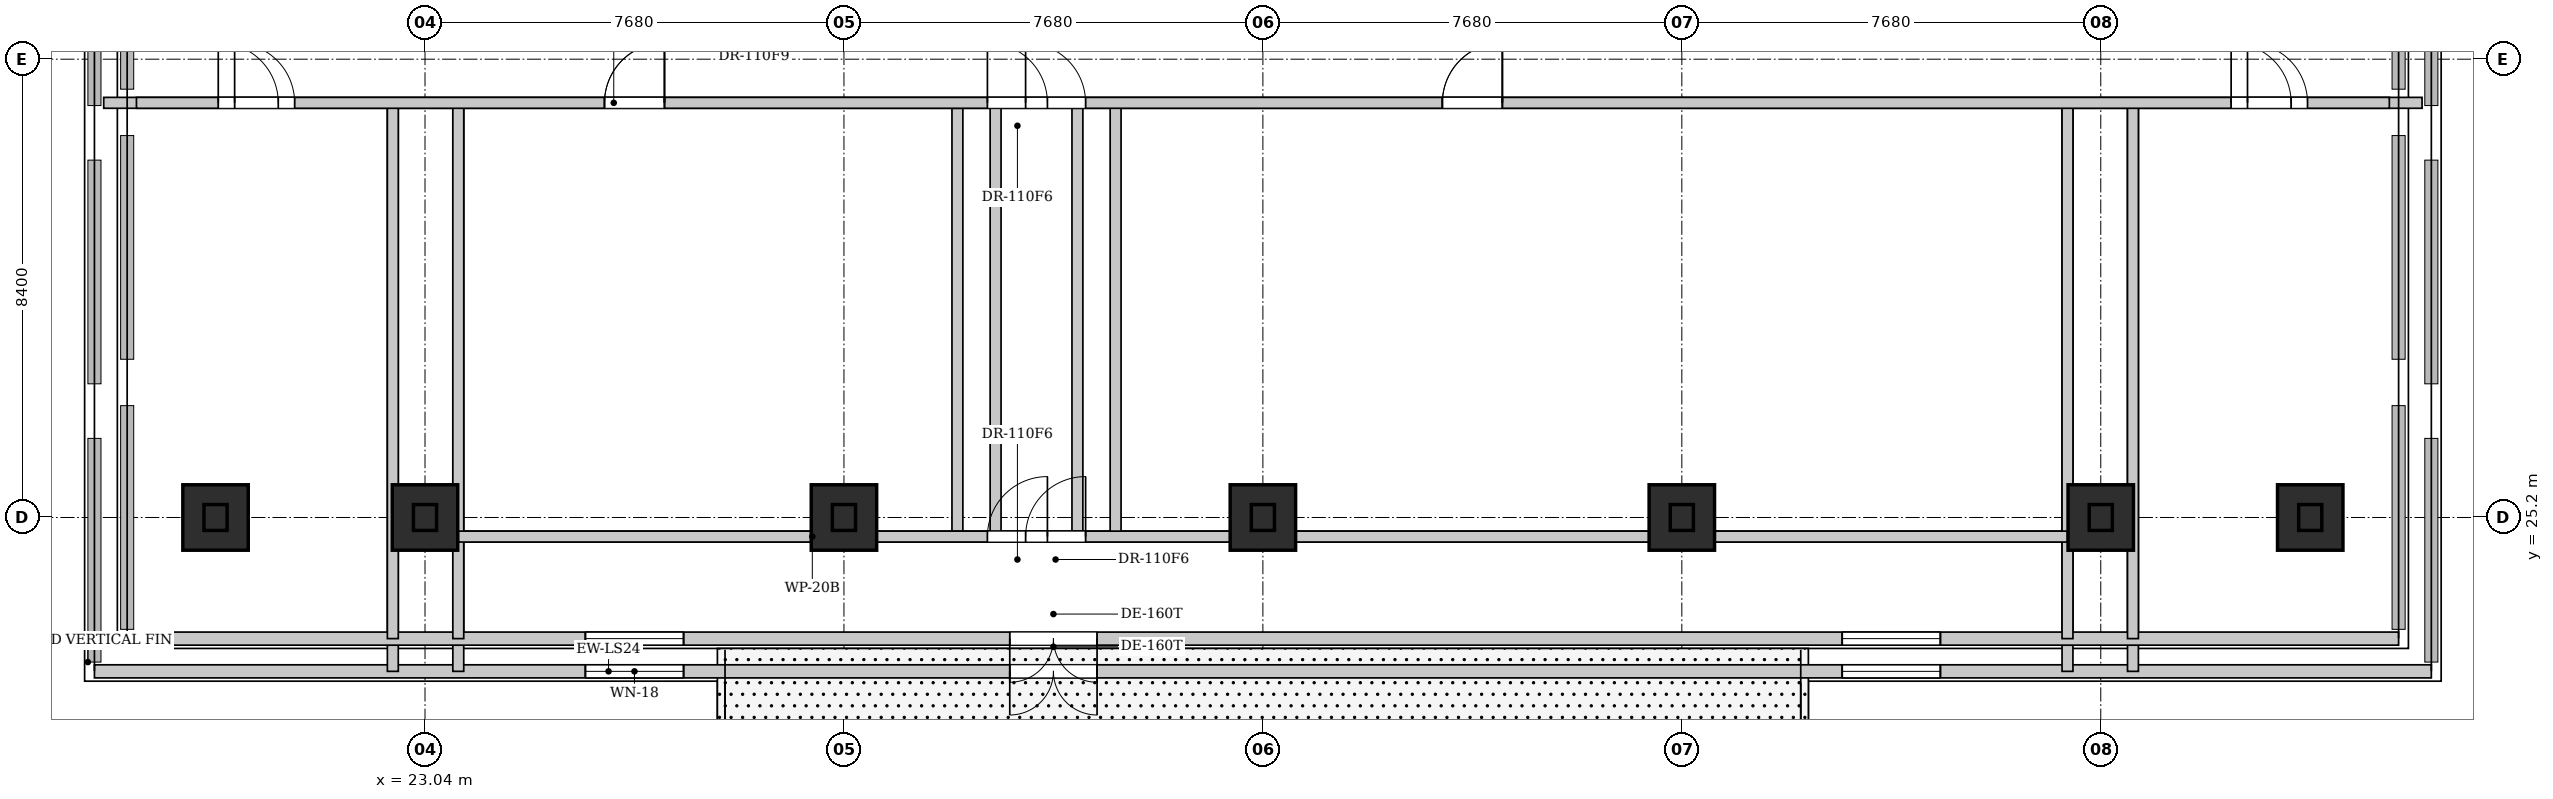
"""IFC4 building model, lengths in metres.
Left out: names, types, materials, properties, quantities, classifications, styles, units other than length and angle.
Written with IfcOpenShell. Run it as: python <this file> out.ifc"""

import sys

from ifc_helpers import new_model, si_unit, direction, frame, frame_2d, origin, origin_2d, place, context, subcontext, project, spatial, rectangle, extrude, element, fill, save


model = new_model("IFC4")
c1 = context("Model", 3, precision=1e-05, world=origin(), true_north=direction((0.0, 1.0)))
c2 = subcontext(c1, "Body", "Model", "MODEL_VIEW")
j1 = project(units=[si_unit("LENGTHUNIT", "METRE"), si_unit("PLANEANGLEUNIT", "RADIAN")], contexts=[c1])
p1 = place(None, origin())
s1 = spatial("IfcSite", under=j1, at=p1, CompositionType="ELEMENT")
p2 = place(p1, origin())
s2 = spatial("IfcBuilding", under=s1, at=p2, CompositionType="ELEMENT")
p3 = place(p2, frame((0.0, 0.0, 78.0)))
s3 = spatial("IfcBuildingStorey", under=s2, at=p3, CompositionType="ELEMENT", Elevation=78.0)
for number, where, z_axis, x_axis in (
    (1, (23.04, 25.2, 0.0), (0.0, 0.0, 1.0), (1.0, 0.0, 0.0)),
    (2, (30.72, 25.2, 0.0), (0.0, 0.0, 1.0), (1.0, 0.0, 0.0)),
    (3, (38.4, 25.2, 0.0), (0.0, 0.0, 1.0), (1.0, 0.0, 0.0)),
    (4, (46.08, 25.2, 0.0), (0.0, 0.0, 1.0), (1.0, 0.0, 0.0)),
    (5, (53.76, 25.2, 0.0), (0.0, 0.0, 1.0), (1.0, 0.0, 0.0)),
    (6, (19.2, 25.2, 0.0), (0.0, 0.0, 1.0), (1.0, 0.0, 0.0)),
    (7, (57.6, 25.2, 0.0), (0.0, 0.0, 1.0), (1.0, 0.0, 0.0)),
):
    element("IfcColumn", number, at=place(p3, frame(where, z_axis=z_axis, x_axis=x_axis)), inside=s3, PredefinedType="COLUMN", context=c2, shape_type="SweptSolid", body=[
        extrude(rectangle(XDim=1.2, YDim=1.2, at=origin_2d()), origin(), (0.0, 0.0, 1.0), 3.9),
    ])
p4 = place(p3, frame((16.98, 22.38, 0.0), z_axis=(0.0, 0.0, 1.0), x_axis=(1.0, 0.0, 0.0)))
e8 = element("IfcWall", 8, at=p4, inside=s3, PredefinedType="SOLIDWALL", context=c2, shape_type="SweptSolid", body=[
    extrude(rectangle(XDim=42.84, YDim=0.24, at=frame_2d((21.42, 0.0))), origin(), (0.0, 0.0, 1.0), 3.68),
])
p5 = place(p4, frame((16.78, 0.0, 0.0)))
e9 = element("IfcOpeningElement", 9, at=p5, cuts=e8, PredefinedType="OPENING", context=c2, shape_type="SweptSolid", body=[
    extrude(rectangle(XDim=1.6, YDim=2.25, at=frame_2d((0.8, 1.125))), frame((0.0, 0.13, 0.0), z_axis=(0.0, -1.0, 0.0), x_axis=(1.0, 0.0, 0.0)), (0.0, 0.0, 1.0), 0.26),
])
p6 = place(p4, frame((9.0, 0.0, 0.9)))
e10 = element("IfcOpeningElement", 10, at=p6, cuts=e8, PredefinedType="OPENING", context=c2, shape_type="SweptSolid", body=[
    extrude(rectangle(XDim=1.8, YDim=2.0, at=frame_2d((0.9, 1.0))), frame((0.0, 0.13, 0.0), z_axis=(0.0, -1.0, 0.0), x_axis=(1.0, 0.0, 0.0)), (0.0, 0.0, 1.0), 0.26),
])
p7 = place(p4, frame((32.04, 0.0, 0.9)))
e11 = element("IfcOpeningElement", 11, at=p7, cuts=e8, PredefinedType="OPENING", context=c2, shape_type="SweptSolid", body=[
    extrude(rectangle(XDim=1.8, YDim=2.0, at=frame_2d((0.9, 1.0))), frame((0.0, 0.13, 0.0), z_axis=(0.0, -1.0, 0.0), x_axis=(1.0, 0.0, 0.0)), (0.0, 0.0, 1.0), 0.26),
])
for number, where, z_axis, x_axis in (
    (12, (22.45, 22.38, 0.0), (0.0, 0.0, 1.0), (0.0, 1.0, 0.0)),
    (13, (23.65, 22.38, 0.0), (0.0, 0.0, 1.0), (0.0, 1.0, 0.0)),
    (14, (53.15, 22.38, 0.0), (0.0, 0.0, 1.0), (0.0, 1.0, 0.0)),
    (15, (54.35, 22.38, 0.0), (0.0, 0.0, 1.0), (0.0, 1.0, 0.0)),
):
    element("IfcWall", number, at=place(p3, frame(where, z_axis=z_axis, x_axis=x_axis)), inside=s3, PredefinedType="PARTITIONING", context=c2, shape_type="SweptSolid", body=[
        extrude(rectangle(XDim=10.42, YDim=0.2, at=frame_2d((5.21, 0.0))), origin(), (0.0, 0.0, 1.0), 3.68),
    ])
for number, where, z_axis, x_axis in (
    (16, (32.8, 24.85, 0.0), (0.0, 0.0, 1.0), (0.0, 1.0, 0.0)),
    (17, (35.0, 24.85, 0.0), (0.0, 0.0, 1.0), (0.0, 1.0, 0.0)),
):
    element("IfcWall", number, at=place(p3, frame(where, z_axis=z_axis, x_axis=x_axis)), inside=s3, PredefinedType="PARTITIONING", context=c2, shape_type="SweptSolid", body=[
        extrude(rectangle(XDim=7.95, YDim=0.2, at=frame_2d((3.975, 0.0))), origin(), (0.0, 0.0, 1.0), 3.68),
    ])
p8 = place(p3, frame((23.65, 24.85, 0.0), z_axis=(0.0, 0.0, 1.0), x_axis=(1.0, 0.0, 0.0)))
e18 = element("IfcWall", 18, at=p8, inside=s3, PredefinedType="PARTITIONING", context=c2, shape_type="SweptSolid", body=[
    extrude(rectangle(XDim=29.5, YDim=0.2, at=frame_2d((14.75, 0.0))), origin(), (0.0, 0.0, 1.0), 3.68),
])
p9 = place(p8, frame((9.7, 0.0, 0.0)))
e19 = element("IfcOpeningElement", 19, at=p9, cuts=e18, PredefinedType="OPENING", context=c2, shape_type="SweptSolid", body=[
    extrude(rectangle(XDim=1.1, YDim=2.15, at=frame_2d((0.55, 1.075))), frame((0.0, 0.11, 0.0), z_axis=(0.0, -1.0, 0.0), x_axis=(1.0, 0.0, 0.0)), (0.0, 0.0, 1.0), 0.22),
])
p10 = place(p3, frame((17.15, 32.8, 0.0), z_axis=(0.0, 0.0, 1.0), x_axis=(1.0, 0.0, 0.0)))
e20 = element("IfcWall", 20, at=p10, inside=s3, PredefinedType="PARTITIONING", context=c2, shape_type="SweptSolid", body=[
    extrude(rectangle(XDim=42.5, YDim=0.2, at=frame_2d((21.25, 0.0))), origin(), (0.0, 0.0, 1.0), 3.68),
])
p11 = place(p10, frame((2.1, 0.0, 0.0)))
e21 = element("IfcOpeningElement", 21, at=p11, cuts=e20, PredefinedType="OPENING", context=c2, shape_type="SweptSolid", body=[
    extrude(rectangle(XDim=1.1, YDim=2.15, at=frame_2d((0.55, 1.075))), frame((0.0, 0.11, 0.0), z_axis=(0.0, -1.0, 0.0), x_axis=(1.0, 0.0, 0.0)), (0.0, 0.0, 1.0), 0.22),
])
p12 = place(p10, frame((9.18, 0.0, 0.0)))
e22 = element("IfcOpeningElement", 22, at=p12, cuts=e20, PredefinedType="OPENING", context=c2, shape_type="SweptSolid", body=[
    extrude(rectangle(XDim=1.1, YDim=2.15, at=frame_2d((0.55, 1.075))), frame((0.0, 0.11, 0.0), z_axis=(0.0, -1.0, 0.0), x_axis=(1.0, 0.0, 0.0)), (0.0, 0.0, 1.0), 0.22),
])
p13 = place(p10, frame((16.2, 0.0, 0.0)))
e23 = element("IfcOpeningElement", 23, at=p13, cuts=e20, PredefinedType="OPENING", context=c2, shape_type="SweptSolid", body=[
    extrude(rectangle(XDim=1.1, YDim=2.15, at=frame_2d((0.55, 1.075))), frame((0.0, 0.11, 0.0), z_axis=(0.0, -1.0, 0.0), x_axis=(1.0, 0.0, 0.0)), (0.0, 0.0, 1.0), 0.22),
])
p14 = place(p10, frame((24.54, 0.0, 0.0)))
e24 = element("IfcOpeningElement", 24, at=p14, cuts=e20, PredefinedType="OPENING", context=c2, shape_type="SweptSolid", body=[
    extrude(rectangle(XDim=1.1, YDim=2.15, at=frame_2d((0.55, 1.075))), frame((0.0, 0.11, 0.0), z_axis=(0.0, -1.0, 0.0), x_axis=(1.0, 0.0, 0.0)), (0.0, 0.0, 1.0), 0.22),
])
p15 = place(p10, frame((39.3, 0.0, 0.0)))
e25 = element("IfcOpeningElement", 25, at=p15, cuts=e20, PredefinedType="OPENING", context=c2, shape_type="SweptSolid", body=[
    extrude(rectangle(XDim=1.1, YDim=2.15, at=frame_2d((0.55, 1.075))), frame((0.0, 0.11, 0.0), z_axis=(0.0, -1.0, 0.0), x_axis=(1.0, 0.0, 0.0)), (0.0, 0.0, 1.0), 0.22),
])
p16 = place(p5, frame((1.6, 0.0, 0.0), z_axis=(0.0, 0.0, 1.0), x_axis=(-1.0, 0.0, 0.0)))
e26 = element("IfcDoor", 26, at=p16, inside=s3, OperationType="SINGLE_SWING_LEFT", PredefinedType="DOOR", context=c2, shape_type="SweptSolid", body=[
    extrude(rectangle(XDim=1.6, YDim=2.25, at=frame_2d((0.8, 1.125))), frame((0.0, 0.025, 0.0), z_axis=(0.0, -1.0, 0.0), x_axis=(1.0, 0.0, 0.0)), (0.0, 0.0, 1.0), 0.05),
])
fill(e9, e26)
p17 = place(p6, origin())
e27 = element("IfcWindow", 27, at=p17, inside=s3, PartitioningType="SINGLE_PANEL", PredefinedType="WINDOW", context=c2, shape_type="SweptSolid", body=[
    extrude(rectangle(XDim=1.8, YDim=2.0, at=frame_2d((0.9, 1.0))), frame((0.0, 0.03, 0.0), z_axis=(0.0, -1.0, 0.0), x_axis=(1.0, 0.0, 0.0)), (0.0, 0.0, 1.0), 0.06),
])
fill(e10, e27)
p18 = place(p7, origin())
e28 = element("IfcWindow", 28, at=p18, inside=s3, PartitioningType="SINGLE_PANEL", PredefinedType="WINDOW", context=c2, shape_type="SweptSolid", body=[
    extrude(rectangle(XDim=1.8, YDim=2.0, at=frame_2d((0.9, 1.0))), frame((0.0, 0.03, 0.0), z_axis=(0.0, -1.0, 0.0), x_axis=(1.0, 0.0, 0.0)), (0.0, 0.0, 1.0), 0.06),
])
fill(e11, e28)
p19 = place(p9, origin())
e29 = element("IfcDoor", 29, at=p19, inside=s3, OperationType="SINGLE_SWING_RIGHT", PredefinedType="DOOR", context=c2, shape_type="SweptSolid", body=[
    extrude(rectangle(XDim=1.1, YDim=2.15, at=frame_2d((0.55, 1.075))), frame((0.0, 0.025, 0.0), z_axis=(0.0, -1.0, 0.0), x_axis=(1.0, 0.0, 0.0)), (0.0, 0.0, 1.0), 0.05),
])
fill(e19, e29)
p20 = place(p11, origin())
e30 = element("IfcDoor", 30, at=p20, inside=s3, OperationType="SINGLE_SWING_LEFT", PredefinedType="DOOR", context=c2, shape_type="SweptSolid", body=[
    extrude(rectangle(XDim=1.1, YDim=2.15, at=frame_2d((0.55, 1.075))), frame((0.0, 0.025, 0.0), z_axis=(0.0, -1.0, 0.0), x_axis=(1.0, 0.0, 0.0)), (0.0, 0.0, 1.0), 0.05),
])
fill(e21, e30)
p21 = place(p12, origin())
e31 = element("IfcDoor", 31, at=p21, inside=s3, OperationType="SINGLE_SWING_RIGHT", PredefinedType="DOOR", context=c2, shape_type="SweptSolid", body=[
    extrude(rectangle(XDim=1.1, YDim=2.15, at=frame_2d((0.55, 1.075))), frame((0.0, 0.025, 0.0), z_axis=(0.0, -1.0, 0.0), x_axis=(1.0, 0.0, 0.0)), (0.0, 0.0, 1.0), 0.05),
])
fill(e22, e31)
p22 = place(p13, origin())
e32 = element("IfcDoor", 32, at=p22, inside=s3, OperationType="SINGLE_SWING_LEFT", PredefinedType="DOOR", context=c2, shape_type="SweptSolid", body=[
    extrude(rectangle(XDim=1.1, YDim=2.15, at=frame_2d((0.55, 1.075))), frame((0.0, 0.025, 0.0), z_axis=(0.0, -1.0, 0.0), x_axis=(1.0, 0.0, 0.0)), (0.0, 0.0, 1.0), 0.05),
])
fill(e23, e32)
p23 = place(p14, origin())
e33 = element("IfcDoor", 33, at=p23, inside=s3, OperationType="SINGLE_SWING_RIGHT", PredefinedType="DOOR", context=c2, shape_type="SweptSolid", body=[
    extrude(rectangle(XDim=1.1, YDim=2.15, at=frame_2d((0.55, 1.075))), frame((0.0, 0.025, 0.0), z_axis=(0.0, -1.0, 0.0), x_axis=(1.0, 0.0, 0.0)), (0.0, 0.0, 1.0), 0.05),
])
fill(e24, e33)
p24 = place(p15, origin())
e34 = element("IfcDoor", 34, at=p24, inside=s3, OperationType="SINGLE_SWING_LEFT", PredefinedType="DOOR", context=c2, shape_type="SweptSolid", body=[
    extrude(rectangle(XDim=1.1, YDim=2.15, at=frame_2d((0.55, 1.075))), frame((0.0, 0.025, 0.0), z_axis=(0.0, -1.0, 0.0), x_axis=(1.0, 0.0, 0.0)), (0.0, 0.0, 1.0), 0.05),
])
fill(e25, e34)
save(model, sys.argv[1])
